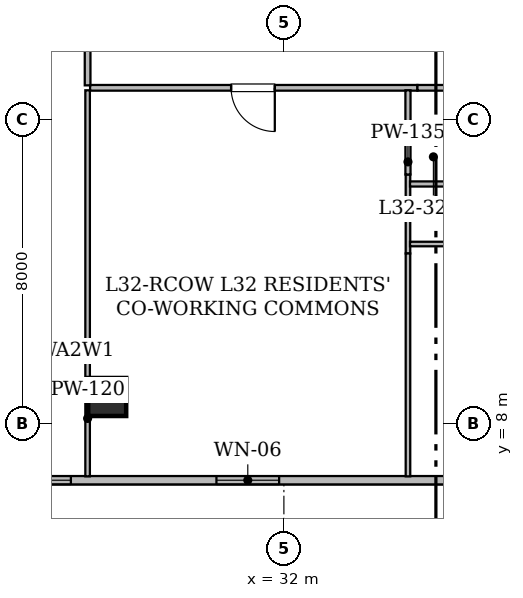
"""IFC4 building model, lengths in metres.
Left out: names, types, materials, properties, quantities, classifications, styles, units other than length and angle.
Written with IfcOpenShell. Run it as: python <this file> out.ifc"""

import sys

from ifc_helpers import new_model, si_unit, direction, frame, frame_2d, origin, origin_2d, place, context, subcontext, project, spatial, rectangle, hollow_rectangle, extrude, element, fill, save


model = new_model("IFC4")
c1 = context("Model", 3, precision=1e-05, world=origin(), true_north=direction((0.0, 1.0)))
c2 = subcontext(c1, "Body", "Model", "MODEL_VIEW")
j1 = project(units=[si_unit("LENGTHUNIT", "METRE"), si_unit("PLANEANGLEUNIT", "RADIAN")], contexts=[c1])
p1 = place(None, origin())
s1 = spatial("IfcSite", under=j1, at=p1, CompositionType="ELEMENT")
p2 = place(p1, origin())
s2 = spatial("IfcBuilding", under=s1, at=p2, CompositionType="ELEMENT")
p3 = place(p2, frame((0.0, 0.0, 127.45)))
s3 = spatial("IfcBuildingStorey", under=s2, at=p3, CompositionType="ELEMENT", Elevation=127.45)
p4 = place(p3, frame((27.35, 8.7, 0.0), z_axis=(0.0, 0.0, 1.0), x_axis=(1.0, 0.0, 0.0)))
e1 = element("IfcColumn", 1, at=p4, inside=s3, PredefinedType="COLUMN", context=c2, shape_type="SweptSolid", body=[
    extrude(hollow_rectangle(XDim=1.0, YDim=1.0, WallThickness=0.05, at=origin_2d()), origin(), (0.0, 0.0, 1.0), 3.65),
])
p5 = place(p3, frame((52.283, 6.51, 0.0), z_axis=(0.0, 0.0, 1.0), x_axis=(-1.0, 0.0, 0.0)))
e2 = element("IfcWall", 2, at=p5, inside=s3, PredefinedType="STANDARD", context=c2, shape_type="SweptSolid", body=[
    extrude(rectangle(XDim=38.568, YDim=0.22, at=frame_2d((19.284, 0.0))), origin(), (0.0, 0.0, 1.0), 3.43),
])
p6 = place(p5, frame((20.408, 0.0, 0.85)))
e3 = element("IfcOpeningElement", 3, at=p6, cuts=e2, PredefinedType="OPENING", context=c2, shape_type="SweptSolid", body=[
    extrude(rectangle(XDim=1.65, YDim=1.55, at=frame_2d((0.825, 0.775))), frame((0.0, 0.12, 0.0), z_axis=(0.0, -1.0, 0.0), x_axis=(1.0, 0.0, 0.0)), (0.0, 0.0, 1.0), 0.24),
])
p7 = place(p5, frame((35.483, 0.0, 0.85)))
e4 = element("IfcOpeningElement", 4, at=p7, cuts=e2, PredefinedType="OPENING", context=c2, shape_type="SweptSolid", body=[
    extrude(rectangle(XDim=1.65, YDim=1.55, at=frame_2d((0.825, 0.775))), frame((0.0, 0.12, 0.0), z_axis=(0.0, -1.0, 0.0), x_axis=(1.0, 0.0, 0.0)), (0.0, 0.0, 1.0), 0.24),
])
p8 = place(p5, frame((25.888, 0.0, 0.85)))
e5 = element("IfcOpeningElement", 5, at=p8, cuts=e2, PredefinedType="OPENING", context=c2, shape_type="SweptSolid", body=[
    extrude(rectangle(XDim=1.65, YDim=1.55, at=frame_2d((0.825, 0.775))), frame((0.0, 0.12, 0.0), z_axis=(0.0, -1.0, 0.0), x_axis=(1.0, 0.0, 0.0)), (0.0, 0.0, 1.0), 0.24),
])
p9 = place(p5, frame((28.168, 0.0, 0.8)))
e6 = element("IfcOpeningElement", 6, at=p9, cuts=e2, PredefinedType="OPENING", context=c2, shape_type="SweptSolid", body=[
    extrude(rectangle(XDim=1.2, YDim=1.5, at=frame_2d((0.6, 0.75))), frame((0.0, 0.12, 0.0), z_axis=(0.0, -1.0, 0.0), x_axis=(1.0, 0.0, 0.0)), (0.0, 0.0, 1.0), 0.24),
])
p10 = place(p5, frame((31.371, 0.0, 0.85)))
e7 = element("IfcOpeningElement", 7, at=p10, cuts=e2, PredefinedType="OPENING", context=c2, shape_type="SweptSolid", body=[
    extrude(rectangle(XDim=1.65, YDim=1.55, at=frame_2d((0.825, 0.775))), frame((0.0, 0.12, 0.0), z_axis=(0.0, -1.0, 0.0), x_axis=(1.0, 0.0, 0.0)), (0.0, 0.0, 1.0), 0.24),
])
p11 = place(p5, frame((13.143, 0.0, 0.85)))
e8 = element("IfcOpeningElement", 8, at=p11, cuts=e2, PredefinedType="OPENING", context=c2, shape_type="SweptSolid", body=[
    extrude(rectangle(XDim=1.65, YDim=1.55, at=frame_2d((0.825, 0.775))), frame((0.0, 0.12, 0.0), z_axis=(0.0, -1.0, 0.0), x_axis=(1.0, 0.0, 0.0)), (0.0, 0.0, 1.0), 0.24),
])
p12 = place(p5, frame((6.688, 0.0, 0.85)))
e9 = element("IfcOpeningElement", 9, at=p12, cuts=e2, PredefinedType="OPENING", context=c2, shape_type="SweptSolid", body=[
    extrude(rectangle(XDim=1.65, YDim=1.55, at=frame_2d((0.825, 0.775))), frame((0.0, 0.12, 0.0), z_axis=(0.0, -1.0, 0.0), x_axis=(1.0, 0.0, 0.0)), (0.0, 0.0, 1.0), 0.24),
])
p13 = place(p3, frame((35.514, 16.835, 0.0), z_axis=(0.0, 0.0, 1.0), x_axis=(-1.0, 0.0, 0.0)))
e10 = element("IfcWall", 10, at=p13, inside=s3, PredefinedType="STANDARD", context=c2, shape_type="SweptSolid", body=[
    extrude(rectangle(XDim=8.614, YDim=0.15, at=frame_2d((4.307, 0.0))), origin(), (0.0, 0.0, 1.0), 2.647),
])
p14 = place(p13, frame((3.753, 0.0, 0.0)))
e11 = element("IfcOpeningElement", 11, at=p14, cuts=e10, PredefinedType="OPENING", context=c2, shape_type="SweptSolid", body=[
    extrude(rectangle(XDim=1.15, YDim=2.2, at=frame_2d((0.575, 1.1))), frame((0.0, 0.085, 0.0), z_axis=(0.0, -1.0, 0.0), x_axis=(1.0, 0.0, 0.0)), (0.0, 0.0, 1.0), 0.17),
])
p15 = place(p3, frame((26.835, 16.9, 0.0), z_axis=(0.0, 0.0, 1.0), x_axis=(0.0, 1.0, 0.0)))
e12 = element("IfcWall", 12, at=p15, inside=s3, PredefinedType="STANDARD", context=c2, shape_type="SweptSolid", body=[
    extrude(rectangle(XDim=2.343, YDim=0.15, at=frame_2d((1.171, 0.0))), origin(), (0.0, 0.0, 1.0), 2.647),
])
p16 = place(p3, frame((36.966, 16.835, 0.0), z_axis=(0.0, 0.0, 1.0), x_axis=(-1.0, 0.0, 0.0)))
e13 = element("IfcWall", 13, at=p16, inside=s3, PredefinedType="STANDARD", context=c2, shape_type="SweptSolid", body=[
    extrude(rectangle(XDim=1.452, YDim=0.15, at=frame_2d((0.726, 0.0))), origin(), (0.0, 0.0, 1.0), 3.43),
])
p17 = place(p3, frame((26.835, 6.612, 0.0), z_axis=(0.0, 0.0, 1.0), x_axis=(0.0, 1.0, 0.0)))
e14 = element("IfcWall", 14, at=p17, inside=s3, PredefinedType="PARTITIONING", context=c2, shape_type="SweptSolid", body=[
    extrude(rectangle(XDim=10.158, YDim=0.12, at=frame_2d((5.079, 0.0))), origin(), (0.0, 0.0, 1.0), 2.876),
])
p18 = place(p3, frame((35.265, 14.554, 0.0), z_axis=(0.0, 0.0, 1.0), x_axis=(0.0, -1.0, 0.0)))
e15 = element("IfcWall", 15, at=p18, inside=s3, PredefinedType="PARTITIONING", context=c2, shape_type="SweptSolid", body=[
    extrude(rectangle(XDim=2.078, YDim=0.12, at=frame_2d((1.039, 0.0))), origin(), (0.0, 0.0, 1.0), 3.43),
])
p19 = place(p3, frame((35.265, 16.77, 0.0), z_axis=(0.0, 0.0, 1.0), x_axis=(0.0, -1.0, 0.0)))
e16 = element("IfcWall", 16, at=p19, inside=s3, PredefinedType="PARTITIONING", context=c2, shape_type="SweptSolid", body=[
    extrude(rectangle(XDim=2.216, YDim=0.135, at=frame_2d((1.108, 0.0))), origin(), (0.0, 0.0, 1.0), 3.43),
])
p20 = place(p3, frame((35.265, 12.476, 0.0), z_axis=(0.0, 0.0, 1.0), x_axis=(0.0, -1.0, 0.0)))
e17 = element("IfcWall", 17, at=p20, inside=s3, PredefinedType="PARTITIONING", context=c2, shape_type="SweptSolid", body=[
    extrude(rectangle(XDim=5.864, YDim=0.12, at=frame_2d((2.932, 0.0))), origin(), (0.0, 0.0, 1.0), 2.876),
])
p21 = place(p3, frame((35.319, 14.305, 0.0), z_axis=(0.0, 0.0, 1.0), x_axis=(1.0, 0.0, 0.0)))
e18 = element("IfcWall", 18, at=p21, inside=s3, PredefinedType="PARTITIONING", context=c2, shape_type="SweptSolid", body=[
    extrude(rectangle(XDim=1.961, YDim=0.135, at=frame_2d((0.98, 0.0))), origin(), (0.0, 0.0, 1.0), 3.43),
])
p22 = place(p3, frame((41.3, 12.725, 0.0), z_axis=(0.0, 0.0, 1.0), x_axis=(-1.0, 0.0, 0.0)))
e19 = element("IfcWall", 19, at=p22, inside=s3, PredefinedType="PARTITIONING", context=c2, shape_type="SweptSolid", body=[
    extrude(rectangle(XDim=5.981, YDim=0.12, at=frame_2d((2.99, 0.0))), origin(), (0.0, 0.0, 1.0), 2.647),
])
p23 = place(p22, frame((2.54, 0.0, 0.0)))
e20 = element("IfcOpeningElement", 20, at=p23, cuts=e19, PredefinedType="OPENING", context=c2, shape_type="SweptSolid", body=[
    extrude(rectangle(XDim=0.9, YDim=2.1, at=frame_2d((0.45, 1.05))), frame((0.0, 0.07, 0.0), z_axis=(0.0, -1.0, 0.0), x_axis=(1.0, 0.0, 0.0)), (0.0, 0.0, 1.0), 0.14),
])
p24 = place(p6, origin())
e21 = element("IfcWindow", 21, at=p24, inside=s3, PartitioningType="SINGLE_PANEL", PredefinedType="WINDOW", context=c2, shape_type="SweptSolid", body=[
    extrude(rectangle(XDim=1.65, YDim=1.55, at=frame_2d((0.825, 0.775))), frame((0.0, 0.03, 0.0), z_axis=(0.0, -1.0, 0.0), x_axis=(1.0, 0.0, 0.0)), (0.0, 0.0, 1.0), 0.06),
])
fill(e3, e21)
p25 = place(p8, origin())
e22 = element("IfcWindow", 22, at=p25, inside=s3, PartitioningType="SINGLE_PANEL", PredefinedType="WINDOW", context=c2, shape_type="SweptSolid", body=[
    extrude(rectangle(XDim=1.65, YDim=1.55, at=frame_2d((0.825, 0.775))), frame((0.0, 0.03, 0.0), z_axis=(0.0, -1.0, 0.0), x_axis=(1.0, 0.0, 0.0)), (0.0, 0.0, 1.0), 0.06),
])
fill(e5, e22)
p26 = place(p14, origin())
e23 = element("IfcDoor", 23, at=p26, inside=s3, OperationType="SINGLE_SWING_LEFT", PredefinedType="DOOR", context=c2, shape_type="SweptSolid", body=[
    extrude(rectangle(XDim=1.15, YDim=2.2, at=frame_2d((0.575, 1.1))), frame((0.0, 0.025, 0.0), z_axis=(0.0, -1.0, 0.0), x_axis=(1.0, 0.0, 0.0)), (0.0, 0.0, 1.0), 0.05),
])
fill(e11, e23)
save(model, sys.argv[1])
